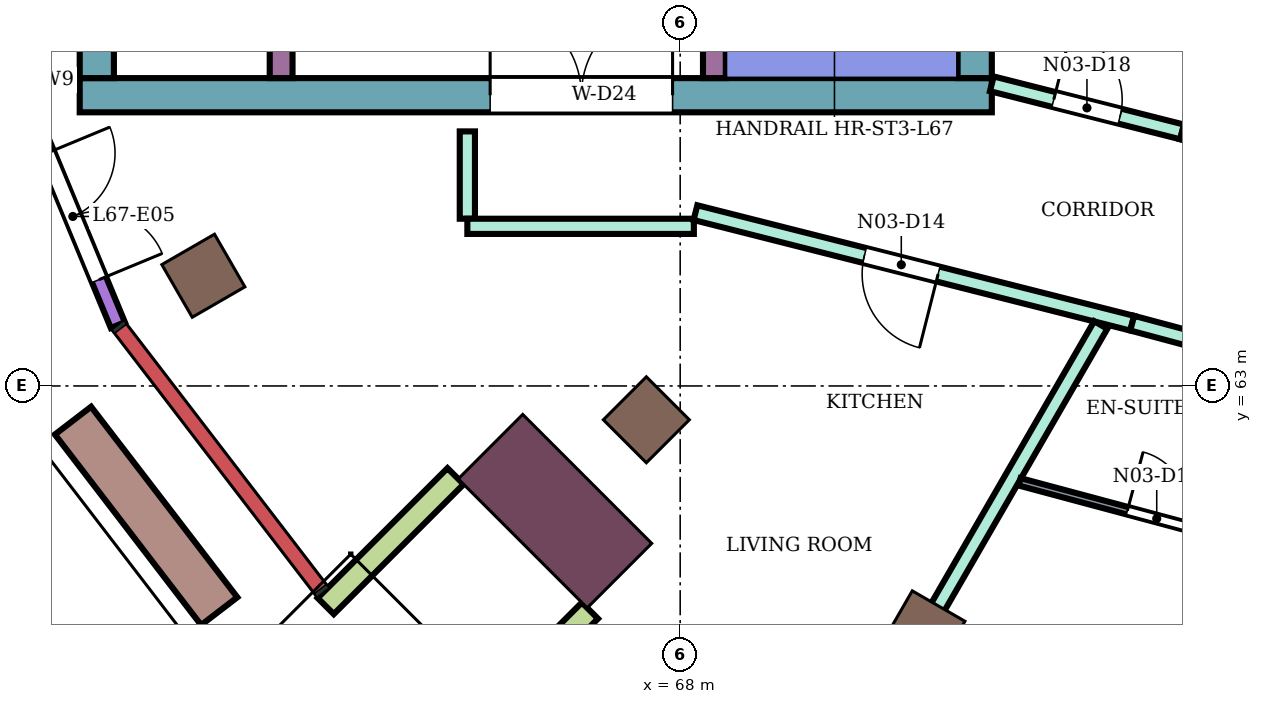
"""IFC4 building model, lengths in metres.
Left out: names, types, materials, properties, quantities, classifications, styles, units other than length and angle.
Written with IfcOpenShell. Run it as: python <this file> out.ifc"""

import sys

from ifc_helpers import new_model, si_unit, direction, frame, frame_2d, origin, origin_2d, place, context, subcontext, project, spatial, rectangle, extrude, element, fill, save


model = new_model("IFC4")
c1 = context("Model", 3, precision=1e-05, world=origin(), true_north=direction((0.0, 1.0)))
c2 = subcontext(c1, "Body", "Model", "MODEL_VIEW")
j1 = project(units=[si_unit("LENGTHUNIT", "METRE"), si_unit("PLANEANGLEUNIT", "RADIAN")], contexts=[c1])
p1 = place(None, origin())
s1 = spatial("IfcSite", under=j1, at=p1, CompositionType="ELEMENT")
p2 = place(p1, origin())
s2 = spatial("IfcBuilding", under=s1, at=p2, CompositionType="ELEMENT")
p3 = place(p2, frame((0.0, 0.0, 292.5)))
s3 = spatial("IfcBuildingStorey", under=s2, at=p3, CompositionType="ELEMENT", Elevation=292.5)
for number, where, z_axis, x_axis in (
    (1, (61.727, 64.45, 0.0), (0.0, 0.0, 1.0), (-0.866, -0.5, 0.0)),
    (2, (67.555, 62.555, 0.0), (0.0, 0.0, 1.0), (-0.707, -0.707, 0.0)),
    (3, (71.2, 59.758, 0.0), (0.0, 0.0, 1.0), (-0.5, -0.866, 0.0)),
):
    element("IfcColumn", number, at=place(p3, frame(where, z_axis=z_axis, x_axis=x_axis)), inside=s3, PredefinedType="COLUMN", context=c2, shape_type="SweptSolid", body=[
        extrude(rectangle(XDim=0.8, YDim=0.8, at=origin_2d()), origin(), (0.0, 0.0, 1.0), 4.2),
    ])
p4 = place(p3, frame((66.353, 61.353, 0.0), z_axis=(0.0, 0.0, 1.0), x_axis=(-0.707106781187, -0.707106781187, 0.0)))
e4 = element("IfcColumn", 4, at=p4, inside=s3, PredefinedType="COLUMN", context=c2, shape_type="SweptSolid", body=[
    extrude(rectangle(XDim=1.2, YDim=2.4, at=origin_2d()), origin(), (0.0, 0.0, 1.0), 4.2),
])
p5 = place(p3, frame((72.1, 66.825, 0.0), z_axis=(0.0, 0.0, 1.0), x_axis=(-1.0, 0.0, 0.0)))
e5 = element("IfcWall", 5, at=p5, inside=s3, PredefinedType="SHEAR", context=c2, shape_type="SweptSolid", body=[
    extrude(rectangle(XDim=12.0, YDim=0.45, at=frame_2d((6.0, 0.0))), origin(), (0.0, 0.0, 1.0), 3.88),
])
p6 = place(p5, frame((4.2, 0.0, 0.0)))
e6 = element("IfcOpeningElement", 6, at=p6, cuts=e5, PredefinedType="OPENING", context=c2, shape_type="SweptSolid", body=[
    extrude(rectangle(XDim=2.4, YDim=2.4, at=frame_2d((1.2, 1.2))), frame((0.0, 0.235, 0.0), z_axis=(0.0, -1.0, 0.0), x_axis=(1.0, 0.0, 0.0)), (0.0, 0.0, 1.0), 0.47),
])
p7 = place(p3, frame((71.875, 75.0, 0.0), z_axis=(0.0, 0.0, 1.0), x_axis=(0.0, -1.0, 0.0)))
e7 = element("IfcWall", 7, at=p7, inside=s3, PredefinedType="SHEAR", context=c2, shape_type="SweptSolid", body=[
    extrude(rectangle(XDim=7.95, YDim=0.45, at=frame_2d((3.975, 0.0))), origin(), (0.0, 0.0, 1.0), 3.88),
])
p8 = place(p3, frame((60.325, 76.4, 0.0), z_axis=(0.0, 0.0, 1.0), x_axis=(0.0, -1.0, 0.0)))
e8 = element("IfcWall", 8, at=p8, inside=s3, PredefinedType="SHEAR", context=c2, shape_type="SweptSolid", body=[
    extrude(rectangle(XDim=9.35, YDim=0.45, at=frame_2d((4.675, 0.0))), origin(), (0.0, 0.0, 1.0), 3.88),
])
p9 = place(p3, frame((68.45, 75.0, 0.0), z_axis=(0.0, 0.0, 1.0), x_axis=(0.0, -1.0, 0.0)))
e9 = element("IfcWall", 9, at=p9, inside=s3, PredefinedType="SHEAR", context=c2, shape_type="SweptSolid", body=[
    extrude(rectangle(XDim=7.95, YDim=0.3, at=frame_2d((3.975, 0.0))), origin(), (0.0, 0.0, 1.0), 3.88),
])
p10 = place(p9, frame((1.85, 0.0, 0.0)))
e10 = element("IfcOpeningElement", 10, at=p10, cuts=e9, PredefinedType="OPENING", context=c2, shape_type="SweptSolid", body=[
    extrude(rectangle(XDim=0.9, YDim=2.1, at=frame_2d((0.45, 1.05))), frame((0.0, 0.16, 0.0), z_axis=(0.0, -1.0, 0.0), x_axis=(1.0, 0.0, 0.0)), (0.0, 0.0, 1.0), 0.32),
])
p11 = place(p3, frame((62.75, 69.95, 0.0), z_axis=(0.0, 0.0, 1.0), x_axis=(0.0, -1.0, 0.0)))
e11 = element("IfcWall", 11, at=p11, inside=s3, PredefinedType="SHEAR", context=c2, shape_type="SweptSolid", body=[
    extrude(rectangle(XDim=2.9, YDim=0.3, at=frame_2d((1.45, 0.0))), origin(), (0.0, 0.0, 1.0), 3.88),
])
p12 = place(p3, frame((58.364, 69.203, 0.0), z_axis=(0.0, 0.0, 1.0), x_axis=(0.382708254591, -0.923869250418, 0.0)))
e12 = element("IfcWall", 12, at=p12, inside=s3, PredefinedType="NOTDEFINED", context=c2, shape_type="SweptSolid", body=[
    extrude(rectangle(XDim=5.847, YDim=0.2, at=frame_2d((2.924, 0.0))), origin(), (0.0, 0.0, 1.0), 4.2),
])
p13 = place(p12, frame((1.75, 0.0, 0.9)))
e13 = element("IfcOpeningElement", 13, at=p13, cuts=e12, PredefinedType="OPENING", context=c2, shape_type="SweptSolid", body=[
    extrude(rectangle(XDim=1.2, YDim=2.7, at=frame_2d((0.6, 1.35))), frame((0.0, 0.11, 0.0), z_axis=(0.0, -1.0, 0.0), x_axis=(1.0, 0.0, 0.0)), (0.0, 0.0, 1.0), 0.22),
])
p14 = place(p12, frame((3.4, 0.0, 0.0)))
e14 = element("IfcOpeningElement", 14, at=p14, cuts=e12, PredefinedType="OPENING", context=c2, shape_type="SweptSolid", body=[
    extrude(rectangle(XDim=1.8, YDim=2.7, at=frame_2d((0.9, 1.35))), frame((0.0, 0.11, 0.0), z_axis=(0.0, -1.0, 0.0), x_axis=(1.0, 0.0, 0.0)), (0.0, 0.0, 1.0), 0.22),
])
for number, where, z_axis, x_axis in (
    (15, (65.045, 61.812, 0.0), (0.0, 0.0, 1.0), (-0.707, -0.707, 0.0)),
    (16, (66.812, 60.045, 0.0), (0.0, 0.0, 1.0), (-0.707, -0.707, 0.0)),
):
    element("IfcWall", number, at=place(p3, frame(where, z_axis=z_axis, x_axis=x_axis)), inside=s3, PredefinedType="NOTDEFINED", context=c2, shape_type="SweptSolid", body=[
        extrude(rectangle(XDim=2.416, YDim=0.3, at=frame_2d((1.208, 0.0))), origin(), (0.0, 0.0, 1.0), 4.2),
    ])
p15 = place(p3, frame((60.012, 62.544, 0.0), z_axis=(0.0, 0.0, 1.0), x_axis=(0.608765634962, -0.793350112932, 0.0)))
e17 = element("IfcWall", 17, at=p15, inside=s3, PredefinedType="USERDEFINED", context=c2, shape_type="SweptSolid", body=[
    extrude(rectangle(XDim=3.16, YDim=0.6, at=frame_2d((1.58, 0.0))), origin(), (0.0, 0.0, 1.0), 0.6),
])
p16 = place(p3, frame((65.2, 65.2, 0.0), z_axis=(0.0, 0.0, 1.0), x_axis=(0.0, 1.0, 0.0)))
e18 = element("IfcWall", 18, at=p16, inside=s3, PredefinedType="PARTITIONING", context=c2, shape_type="SweptSolid", body=[
    extrude(rectangle(XDim=1.149, YDim=0.2, at=frame_2d((0.575, 0.0))), origin(), (0.0, 0.0, 1.0), 3.75),
])
p17 = place(p3, frame((65.2, 65.1, 0.0), z_axis=(0.0, 0.0, 1.0), x_axis=(1.0, 0.0, 0.0)))
e19 = element("IfcWall", 19, at=p17, inside=s3, PredefinedType="PARTITIONING", context=c2, shape_type="SweptSolid", body=[
    extrude(rectangle(XDim=2.98, YDim=0.2, at=frame_2d((1.49, 0.0))), origin(), (0.0, 0.0, 1.0), 3.75),
])
p18 = place(p3, frame((68.201, 65.28, 0.0), z_axis=(0.0, 0.0, 1.0), x_axis=(0.969421088032, -0.245403247897, 0.0)))
e20 = element("IfcWall", 20, at=p18, inside=s3, PredefinedType="PARTITIONING", context=c2, shape_type="SweptSolid", body=[
    extrude(rectangle(XDim=5.927, YDim=0.2, at=frame_2d((2.964, 0.0))), origin(), (0.0, 0.0, 1.0), 3.75),
])
p19 = place(p18, frame((2.293, 0.0, 0.0)))
e21 = element("IfcOpeningElement", 21, at=p19, cuts=e20, PredefinedType="OPENING", context=c2, shape_type="SweptSolid", body=[
    extrude(rectangle(XDim=1.0, YDim=2.1, at=frame_2d((0.5, 1.05))), frame((0.0, 0.11, 0.0), z_axis=(0.0, -1.0, 0.0), x_axis=(1.0, 0.0, 0.0)), (0.0, 0.0, 1.0), 0.22),
])
p20 = place(p3, frame((68.849, 55.692, 0.0), z_axis=(0.0, 0.0, 1.0), x_axis=(0.50011732958, 0.865957652922, 0.0)))
e22 = element("IfcWall", 22, at=p20, inside=s3, PredefinedType="PARTITIONING", context=c2, shape_type="SweptSolid", body=[
    extrude(rectangle(XDim=9.365, YDim=0.2, at=frame_2d((4.683, 0.0))), origin(), (0.0, 0.0, 1.0), 3.75),
])
p21 = place(p3, frame((72.1, 66.975, 0.0), z_axis=(0.0, 0.0, 1.0), x_axis=(0.969471314457, -0.245204752086, 0.0)))
e23 = element("IfcWall", 23, at=p21, inside=s3, PredefinedType="PARTITIONING", context=c2, shape_type="SweptSolid", body=[
    extrude(rectangle(XDim=2.582, YDim=0.2, at=frame_2d((1.291, 0.0))), origin(), (0.0, 0.0, 1.0), 3.75),
])
p22 = place(p21, frame((0.841, 0.0, 0.0)))
e24 = element("IfcOpeningElement", 24, at=p22, cuts=e23, PredefinedType="OPENING", context=c2, shape_type="SweptSolid", body=[
    extrude(rectangle(XDim=0.9, YDim=2.1, at=frame_2d((0.45, 1.05))), frame((0.0, 0.11, 0.0), z_axis=(0.0, -1.0, 0.0), x_axis=(1.0, 0.0, 0.0)), (0.0, 0.0, 1.0), 0.22),
])
p23 = place(p3, frame((73.947, 63.826, 0.0), z_axis=(0.0, 0.0, 1.0), x_axis=(0.965908253407, -0.258884619088, 0.0)))
e25 = element("IfcWall", 25, at=p23, inside=s3, PredefinedType="PARTITIONING", context=c2, shape_type="SweptSolid", body=[
    extrude(rectangle(XDim=6.217, YDim=0.2, at=frame_2d((3.108, 0.0))), origin(), (0.0, 0.0, 1.0), 3.75),
])
p24 = place(p3, frame((74.603, 66.342, 0.0), z_axis=(0.0, 0.0, 1.0), x_axis=(0.965920893652, -0.258837453254, 0.0)))
e26 = element("IfcWall", 26, at=p24, inside=s3, PredefinedType="PARTITIONING", context=c2, shape_type="SweptSolid", body=[
    extrude(rectangle(XDim=5.458, YDim=0.2, at=frame_2d((2.729, 0.0))), origin(), (0.0, 0.0, 1.0), 3.75),
])
p25 = place(p24, frame((2.512, 0.0, 0.0)))
e27 = element("IfcOpeningElement", 27, at=p25, cuts=e26, PredefinedType="OPENING", context=c2, shape_type="SweptSolid", body=[
    extrude(rectangle(XDim=0.9, YDim=2.1, at=frame_2d((0.45, 1.05))), frame((0.0, 0.11, 0.0), z_axis=(0.0, -1.0, 0.0), x_axis=(1.0, 0.0, 0.0)), (0.0, 0.0, 1.0), 0.22),
])
p26 = place(p3, frame((72.465, 61.739, 0.0), z_axis=(0.0, 0.0, 1.0), x_axis=(0.965899611634, -0.258916859715, 0.0)))
e28 = element("IfcWall", 28, at=p26, inside=s3, PredefinedType="PARTITIONING", context=c2, shape_type="SweptSolid", body=[
    extrude(rectangle(XDim=7.74, YDim=0.1, at=frame_2d((3.87, 0.0))), origin(), (0.0, 0.0, 1.0), 3.75),
])
p27 = place(p26, frame((1.468, 0.0, 0.0)))
e29 = element("IfcOpeningElement", 29, at=p27, cuts=e28, PredefinedType="OPENING", context=c2, shape_type="SweptSolid", body=[
    extrude(rectangle(XDim=0.8, YDim=2.1, at=frame_2d((0.4, 1.05))), frame((0.0, 0.06, 0.0), z_axis=(0.0, -1.0, 0.0), x_axis=(1.0, 0.0, 0.0)), (0.0, 0.0, 1.0), 0.12),
])
p28 = place(p3, frame((74.229, 53.462, 0.0), z_axis=(0.0, 0.0, 1.0), x_axis=(0.258810097991, 0.965928223616, 0.0)))
e30 = element("IfcWall", 30, at=p28, inside=s3, PredefinedType="PARTITIONING", context=c2, shape_type="SweptSolid", body=[
    extrude(rectangle(XDim=9.838, YDim=0.1, at=frame_2d((4.919, 0.0))), origin(), (0.0, 0.0, 1.0), 3.75),
])
p29 = place(p28, frame((3.344, 0.0, 0.0)))
e31 = element("IfcOpeningElement", 31, at=p29, cuts=e30, PredefinedType="OPENING", context=c2, shape_type="SweptSolid", body=[
    extrude(rectangle(XDim=0.9, YDim=2.1, at=frame_2d((0.45, 1.05))), frame((0.0, 0.06, 0.0), z_axis=(0.0, -1.0, 0.0), x_axis=(1.0, 0.0, 0.0)), (0.0, 0.0, 1.0), 0.12),
])
p30 = place(p14, origin())
e32 = element("IfcDoor", 32, at=p30, inside=s3, OperationType="DOUBLE_DOOR_SINGLE_SWING", PredefinedType="DOOR", context=c2, shape_type="SweptSolid", body=[
    extrude(rectangle(XDim=1.8, YDim=2.7, at=frame_2d((0.9, 1.35))), frame((0.0, 0.025, 0.0), z_axis=(0.0, -1.0, 0.0), x_axis=(1.0, 0.0, 0.0)), (0.0, 0.0, 1.0), 0.05),
])
fill(e14, e32)
p31 = place(p27, origin())
e33 = element("IfcDoor", 33, at=p31, inside=s3, OperationType="SINGLE_SWING_LEFT", PredefinedType="DOOR", context=c2, shape_type="SweptSolid", body=[
    extrude(rectangle(XDim=0.8, YDim=2.1, at=frame_2d((0.4, 1.05))), frame((0.0, 0.025, 0.0), z_axis=(0.0, -1.0, 0.0), x_axis=(1.0, 0.0, 0.0)), (0.0, 0.0, 1.0), 0.05),
])
fill(e29, e33)
p32 = place(p19, frame((1.0, 0.0, 0.0), z_axis=(0.0, 0.0, 1.0), x_axis=(-1.0, 0.0, 0.0)))
e34 = element("IfcDoor", 34, at=p32, inside=s3, OperationType="SINGLE_SWING_LEFT", PredefinedType="DOOR", context=c2, shape_type="SweptSolid", body=[
    extrude(rectangle(XDim=1.0, YDim=2.1, at=frame_2d((0.5, 1.05))), frame((0.0, 0.025, 0.0), z_axis=(0.0, -1.0, 0.0), x_axis=(1.0, 0.0, 0.0)), (0.0, 0.0, 1.0), 0.05),
])
fill(e21, e34)
p33 = place(p22, origin())
e35 = element("IfcDoor", 35, at=p33, inside=s3, OperationType="SINGLE_SWING_LEFT", PredefinedType="DOOR", context=c2, shape_type="SweptSolid", body=[
    extrude(rectangle(XDim=0.9, YDim=2.1, at=frame_2d((0.45, 1.05))), frame((0.0, 0.025, 0.0), z_axis=(0.0, -1.0, 0.0), x_axis=(1.0, 0.0, 0.0)), (0.0, 0.0, 1.0), 0.05),
])
fill(e24, e35)
p34 = place(p6, frame((2.4, 0.0, 0.0), z_axis=(0.0, 0.0, 1.0), x_axis=(-1.0, 0.0, 0.0)))
e36 = element("IfcDoor", 36, at=p34, inside=s3, OperationType="DOUBLE_DOOR_SINGLE_SWING", PredefinedType="DOOR", context=c2, shape_type="SweptSolid", body=[
    extrude(rectangle(XDim=2.4, YDim=2.4, at=frame_2d((1.2, 1.2))), frame((0.0, 0.025, 0.0), z_axis=(0.0, -1.0, 0.0), x_axis=(1.0, 0.0, 0.0)), (0.0, 0.0, 1.0), 0.05),
])
fill(e6, e36)
save(model, sys.argv[1])
